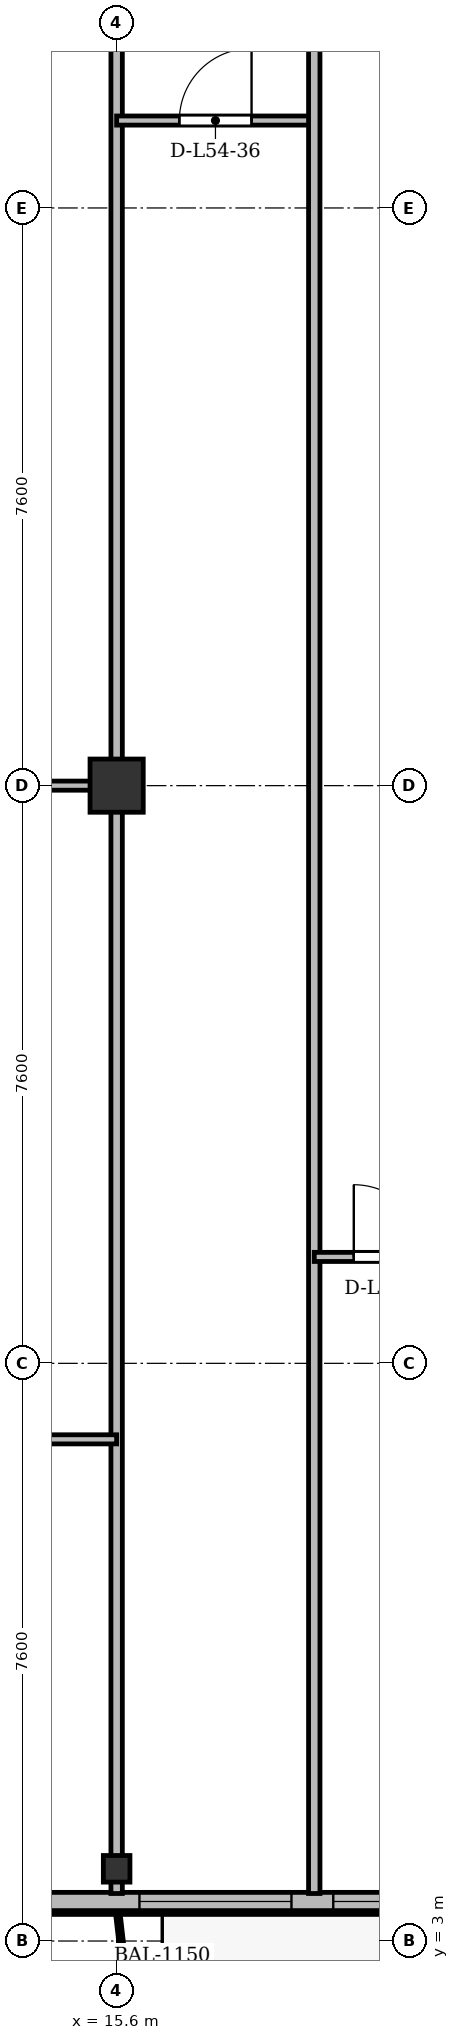
"""IFC4 building model, lengths in metres.
Left out: names, types, materials, properties, quantities, classifications, styles, units other than length and angle.
Written with IfcOpenShell. Run it as: python <this file> out.ifc"""

import sys

from ifc_helpers import new_model, si_unit, direction, frame, frame_2d, origin, origin_2d, place, context, subcontext, project, spatial, rectangle, i_section, extrude, source, transform, mapped, element, fill, save


model = new_model("IFC4")
c1 = context("Model", 3, precision=1e-05, world=origin(), true_north=direction((0.0, 1.0)))
c2 = subcontext(c1, "Body", "Model", "MODEL_VIEW")
j1 = project(units=[si_unit("LENGTHUNIT", "METRE"), si_unit("PLANEANGLEUNIT", "RADIAN")], contexts=[c1])
p1 = place(None, origin())
s1 = spatial("IfcSite", under=j1, at=p1, CompositionType="ELEMENT")
p2 = place(p1, origin())
s2 = spatial("IfcBuilding", under=s1, at=p2, CompositionType="ELEMENT")
p3 = place(p2, frame((0.0, 0.0, 208.5)))
s3 = spatial("IfcBuildingStorey", under=s2, at=p3, CompositionType="ELEMENT", Elevation=208.5)
m1 = source(origin(), c2, "Body", "SweptSolid", [
    extrude(i_section(OverallWidth=0.35, OverallDepth=0.35, WebThickness=0.018, FlangeThickness=0.028, at=origin_2d()), origin(), (0.0, 0.0, 1.0), 3.6),
])
p4 = place(p3, frame((15.6, 3.95, 0.0), z_axis=(0.0, 0.0, 1.0), x_axis=(1.0, 0.0, 0.0)))
e1 = element("IfcColumn", 1, at=p4, inside=s3, PredefinedType="COLUMN", context=c2, shape_type="MappedRepresentation", body=[
    mapped(m1, transform((0.0, 0.0, 0.0), x_axis=(1.0, 0.0, 0.0), y_axis=(0.0, 1.0, 0.0), z_axis=(0.0, 0.0, 1.0), scale=1.0)),
])
m2 = source(origin(), c2, "Body", "SweptSolid", [
    extrude(rectangle(XDim=0.7, YDim=0.7, at=origin_2d()), origin(), (0.0, 0.0, 1.0), 3.6),
])
p5 = place(p3, frame((15.6, 18.2, 0.0), z_axis=(0.0, 0.0, 1.0), x_axis=(1.0, 0.0, 0.0)))
e2 = element("IfcColumn", 2, at=p5, inside=s3, PredefinedType="COLUMN", context=c2, shape_type="MappedRepresentation", body=[
    mapped(m2, transform((0.0, 0.0, 0.0), x_axis=(1.0, 0.0, 0.0), y_axis=(0.0, 1.0, 0.0), z_axis=(0.0, 0.0, 1.0), scale=1.0)),
])
p6 = place(p3, frame((63.4, 3.52, 0.0), z_axis=(0.0, 0.0, 1.0), x_axis=(-1.0, 0.0, 0.0)))
e3 = element("IfcWall", 3, at=p6, inside=s3, PredefinedType="SOLIDWALL", context=c2, shape_type="SweptSolid", body=[
    extrude(rectangle(XDim=52.4, YDim=0.24, at=frame_2d((26.2, 0.0))), origin(), (0.0, 0.0, 1.0), 3.36),
])
p7 = place(p6, frame((1.52, 0.0, 0.9)))
e4 = element("IfcOpeningElement", 4, at=p7, cuts=e3, PredefinedType="OPENING", context=c2, shape_type="SweptSolid", body=[
    extrude(rectangle(XDim=1.65, YDim=1.85, at=frame_2d((0.825, 0.925))), frame((0.0, 0.13, 0.0), z_axis=(0.0, -1.0, 0.0), x_axis=(1.0, 0.0, 0.0)), (0.0, 0.0, 1.0), 0.26),
])
p8 = place(p6, frame((5.0, 0.0, 0.9)))
e5 = element("IfcOpeningElement", 5, at=p8, cuts=e3, PredefinedType="OPENING", context=c2, shape_type="SweptSolid", body=[
    extrude(rectangle(XDim=1.8, YDim=1.8, at=frame_2d((0.9, 0.9))), frame((0.0, 0.13, 0.0), z_axis=(0.0, -1.0, 0.0), x_axis=(1.0, 0.0, 0.0)), (0.0, 0.0, 1.0), 0.26),
])
p9 = place(p6, frame((7.45, 0.0, 0.9)))
e6 = element("IfcOpeningElement", 6, at=p9, cuts=e3, PredefinedType="OPENING", context=c2, shape_type="SweptSolid", body=[
    extrude(rectangle(XDim=1.5, YDim=1.75, at=frame_2d((0.75, 0.875))), frame((0.0, 0.13, 0.0), z_axis=(0.0, -1.0, 0.0), x_axis=(1.0, 0.0, 0.0)), (0.0, 0.0, 1.0), 0.26),
])
p10 = place(p6, frame((10.05, 0.0, 0.9)))
e7 = element("IfcOpeningElement", 7, at=p10, cuts=e3, PredefinedType="OPENING", context=c2, shape_type="SweptSolid", body=[
    extrude(rectangle(XDim=1.5, YDim=1.75, at=frame_2d((0.75, 0.875))), frame((0.0, 0.13, 0.0), z_axis=(0.0, -1.0, 0.0), x_axis=(1.0, 0.0, 0.0)), (0.0, 0.0, 1.0), 0.26),
])
p11 = place(p6, frame((14.217, 0.0, 0.0)))
e8 = element("IfcOpeningElement", 8, at=p11, cuts=e3, PredefinedType="OPENING", context=c2, shape_type="SweptSolid", body=[
    extrude(rectangle(XDim=1.2, YDim=2.2, at=frame_2d((0.6, 1.1))), frame((0.0, 0.13, 0.0), z_axis=(0.0, -1.0, 0.0), x_axis=(1.0, 0.0, 0.0)), (0.0, 0.0, 1.0), 0.26),
])
p12 = place(p6, frame((20.108, 0.0, 0.9)))
e9 = element("IfcOpeningElement", 9, at=p12, cuts=e3, PredefinedType="OPENING", context=c2, shape_type="SweptSolid", body=[
    extrude(rectangle(XDim=1.65, YDim=1.85, at=frame_2d((0.825, 0.925))), frame((0.0, 0.13, 0.0), z_axis=(0.0, -1.0, 0.0), x_axis=(1.0, 0.0, 0.0)), (0.0, 0.0, 1.0), 0.26),
])
p13 = place(p6, frame((22.7, 0.0, 0.9)))
e10 = element("IfcOpeningElement", 10, at=p13, cuts=e3, PredefinedType="OPENING", context=c2, shape_type="SweptSolid", body=[
    extrude(rectangle(XDim=1.8, YDim=1.8, at=frame_2d((0.9, 0.9))), frame((0.0, 0.13, 0.0), z_axis=(0.0, -1.0, 0.0), x_axis=(1.0, 0.0, 0.0)), (0.0, 0.0, 1.0), 0.26),
])
p14 = place(p6, frame((25.166, 0.0, 0.9)))
e11 = element("IfcOpeningElement", 11, at=p14, cuts=e3, PredefinedType="OPENING", context=c2, shape_type="SweptSolid", body=[
    extrude(rectangle(XDim=2.2, YDim=1.8, at=frame_2d((1.1, 0.9))), frame((0.0, 0.13, 0.0), z_axis=(0.0, -1.0, 0.0), x_axis=(1.0, 0.0, 0.0)), (0.0, 0.0, 1.0), 0.26),
])
p15 = place(p6, frame((29.45, 0.0, 0.9)))
e12 = element("IfcOpeningElement", 12, at=p15, cuts=e3, PredefinedType="OPENING", context=c2, shape_type="SweptSolid", body=[
    extrude(rectangle(XDim=1.5, YDim=1.75, at=frame_2d((0.75, 0.875))), frame((0.0, 0.13, 0.0), z_axis=(0.0, -1.0, 0.0), x_axis=(1.0, 0.0, 0.0)), (0.0, 0.0, 1.0), 0.26),
])
p16 = place(p6, frame((33.0, 0.0, 0.9)))
e13 = element("IfcOpeningElement", 13, at=p16, cuts=e3, PredefinedType="OPENING", context=c2, shape_type="SweptSolid", body=[
    extrude(rectangle(XDim=2.0, YDim=1.95, at=frame_2d((1.0, 0.975))), frame((0.0, 0.13, 0.0), z_axis=(0.0, -1.0, 0.0), x_axis=(1.0, 0.0, 0.0)), (0.0, 0.0, 1.0), 0.26),
])
p17 = place(p6, frame((35.575, 0.0, 0.9)))
e14 = element("IfcOpeningElement", 14, at=p17, cuts=e3, PredefinedType="OPENING", context=c2, shape_type="SweptSolid", body=[
    extrude(rectangle(XDim=1.65, YDim=1.85, at=frame_2d((0.825, 0.925))), frame((0.0, 0.13, 0.0), z_axis=(0.0, -1.0, 0.0), x_axis=(1.0, 0.0, 0.0)), (0.0, 0.0, 1.0), 0.26),
])
p18 = place(p6, frame((37.9, 0.0, 0.9)))
e15 = element("IfcOpeningElement", 15, at=p18, cuts=e3, PredefinedType="OPENING", context=c2, shape_type="SweptSolid", body=[
    extrude(rectangle(XDim=1.8, YDim=1.8, at=frame_2d((0.9, 0.9))), frame((0.0, 0.13, 0.0), z_axis=(0.0, -1.0, 0.0), x_axis=(1.0, 0.0, 0.0)), (0.0, 0.0, 1.0), 0.26),
])
p19 = place(p6, frame((41.456, 0.0, 0.0)))
e16 = element("IfcOpeningElement", 16, at=p19, cuts=e3, PredefinedType="OPENING", context=c2, shape_type="SweptSolid", body=[
    extrude(rectangle(XDim=1.2, YDim=2.2, at=frame_2d((0.6, 1.1))), frame((0.0, 0.13, 0.0), z_axis=(0.0, -1.0, 0.0), x_axis=(1.0, 0.0, 0.0)), (0.0, 0.0, 1.0), 0.26),
])
p20 = place(p6, frame((43.45, 0.0, 0.9)))
e17 = element("IfcOpeningElement", 17, at=p20, cuts=e3, PredefinedType="OPENING", context=c2, shape_type="SweptSolid", body=[
    extrude(rectangle(XDim=1.5, YDim=1.75, at=frame_2d((0.75, 0.875))), frame((0.0, 0.13, 0.0), z_axis=(0.0, -1.0, 0.0), x_axis=(1.0, 0.0, 0.0)), (0.0, 0.0, 1.0), 0.26),
])
p21 = place(p6, frame((45.5, 0.0, 0.9)))
e18 = element("IfcOpeningElement", 18, at=p21, cuts=e3, PredefinedType="OPENING", context=c2, shape_type="SweptSolid", body=[
    extrude(rectangle(XDim=2.0, YDim=1.95, at=frame_2d((1.0, 0.975))), frame((0.0, 0.13, 0.0), z_axis=(0.0, -1.0, 0.0), x_axis=(1.0, 0.0, 0.0)), (0.0, 0.0, 1.0), 0.26),
])
p22 = place(p6, frame((49.23, 0.0, 0.9)))
e19 = element("IfcOpeningElement", 19, at=p22, cuts=e3, PredefinedType="OPENING", context=c2, shape_type="SweptSolid", body=[
    extrude(rectangle(XDim=1.65, YDim=1.85, at=frame_2d((0.825, 0.925))), frame((0.0, 0.13, 0.0), z_axis=(0.0, -1.0, 0.0), x_axis=(1.0, 0.0, 0.0)), (0.0, 0.0, 1.0), 0.26),
])
p23 = place(p3, frame((15.6, 3.625, 0.0), z_axis=(0.0, 0.0, 1.0), x_axis=(0.0, 1.0, 0.0)))
e20 = element("IfcWall", 20, at=p23, inside=s3, PredefinedType="PARTITIONING", context=c2, shape_type="SweptSolid", body=[
    extrude(rectangle(XDim=27.175, YDim=0.15, at=frame_2d((13.587, 0.0))), origin(), (0.0, 0.0, 1.0), 2.86),
])
p24 = place(p3, frame((8.24, 18.2, 0.0), z_axis=(0.0, 0.0, 1.0), x_axis=(1.0, 0.0, 0.0)))
e21 = element("IfcWall", 21, at=p24, inside=s3, PredefinedType="PARTITIONING", context=c2, shape_type="SweptSolid", body=[
    extrude(rectangle(XDim=7.36, YDim=0.12, at=frame_2d((3.68, 0.0))), origin(), (0.0, 0.0, 1.0), 2.91),
])
p25 = place(p24, frame((3.114, 0.0, 0.0)))
e22 = element("IfcOpeningElement", 22, at=p25, cuts=e21, PredefinedType="OPENING", context=c2, shape_type="SweptSolid", body=[
    extrude(rectangle(XDim=0.95, YDim=2.15, at=frame_2d((0.475, 1.075))), frame((0.0, 0.07, 0.0), z_axis=(0.0, -1.0, 0.0), x_axis=(1.0, 0.0, 0.0)), (0.0, 0.0, 1.0), 0.14),
])
p26 = place(p3, frame((8.24, 9.6, 0.0), z_axis=(0.0, 0.0, 1.0), x_axis=(1.0, 0.0, 0.0)))
e23 = element("IfcWall", 23, at=p26, inside=s3, PredefinedType="PARTITIONING", context=c2, shape_type="SweptSolid", body=[
    extrude(rectangle(XDim=7.36, YDim=0.12, at=frame_2d((3.68, 0.0))), origin(), (0.0, 0.0, 1.0), 2.86),
])
p27 = place(p26, frame((3.114, 0.0, 0.0)))
e24 = element("IfcOpeningElement", 24, at=p27, cuts=e23, PredefinedType="OPENING", context=c2, shape_type="SweptSolid", body=[
    extrude(rectangle(XDim=0.95, YDim=2.15, at=frame_2d((0.475, 1.075))), frame((0.0, 0.07, 0.0), z_axis=(0.0, -1.0, 0.0), x_axis=(1.0, 0.0, 0.0)), (0.0, 0.0, 1.0), 0.14),
])
p28 = place(p3, frame((15.6, 26.95, 0.0), z_axis=(0.0, 0.0, 1.0), x_axis=(1.0, 0.0, 0.0)))
e25 = element("IfcWall", 25, at=p28, inside=s3, PredefinedType="PARTITIONING", context=c2, shape_type="SweptSolid", body=[
    extrude(rectangle(XDim=2.6, YDim=0.12, at=frame_2d((1.3, 0.0))), origin(), (0.0, 0.0, 1.0), 2.86),
])
p29 = place(p28, frame((0.825, 0.0, 0.0)))
e26 = element("IfcOpeningElement", 26, at=p29, cuts=e25, PredefinedType="OPENING", context=c2, shape_type="SweptSolid", body=[
    extrude(rectangle(XDim=0.95, YDim=2.15, at=frame_2d((0.475, 1.075))), frame((0.0, 0.07, 0.0), z_axis=(0.0, -1.0, 0.0), x_axis=(1.0, 0.0, 0.0)), (0.0, 0.0, 1.0), 0.14),
])
p30 = place(p3, frame((18.2, 3.625, 0.0), z_axis=(0.0, 0.0, 1.0), x_axis=(0.0, 1.0, 0.0)))
e27 = element("IfcWall", 27, at=p30, inside=s3, PredefinedType="PARTITIONING", context=c2, shape_type="SweptSolid", body=[
    extrude(rectangle(XDim=27.175, YDim=0.15, at=frame_2d((13.587, 0.0))), origin(), (0.0, 0.0, 1.0), 2.91),
])
p31 = place(p3, frame((18.2, 12.0, 0.0), z_axis=(0.0, 0.0, 1.0), x_axis=(1.0, 0.0, 0.0)))
e28 = element("IfcWall", 28, at=p31, inside=s3, PredefinedType="PARTITIONING", context=c2, shape_type="SweptSolid", body=[
    extrude(rectangle(XDim=2.0, YDim=0.12, at=frame_2d((1.0, 0.0))), origin(), (0.0, 0.0, 1.0), 3.36),
])
p32 = place(p31, frame((0.52, 0.0, 0.0)))
e29 = element("IfcOpeningElement", 29, at=p32, cuts=e28, PredefinedType="OPENING", context=c2, shape_type="SweptSolid", body=[
    extrude(rectangle(XDim=0.95, YDim=2.15, at=frame_2d((0.475, 1.075))), frame((0.0, 0.07, 0.0), z_axis=(0.0, -1.0, 0.0), x_axis=(1.0, 0.0, 0.0)), (0.0, 0.0, 1.0), 0.14),
])
m3 = source(origin(), c2, "Body", "SweptSolid", [
    extrude(rectangle(XDim=1.5, YDim=1.75, at=frame_2d((0.75, 0.875))), frame((0.0, 0.03, 0.0), z_axis=(0.0, -1.0, 0.0), x_axis=(1.0, 0.0, 0.0)), (0.0, 0.0, 1.0), 0.06),
])
p33 = place(p20, origin())
e30 = element("IfcWindow", 30, at=p33, inside=s3, PartitioningType="SINGLE_PANEL", PredefinedType="WINDOW", context=c2, shape_type="MappedRepresentation", body=[
    mapped(m3, transform((0.0, 0.0, 0.0), x_axis=(1.0, 0.0, 0.0), y_axis=(0.0, 1.0, 0.0), z_axis=(0.0, 0.0, 1.0), scale=1.0)),
])
fill(e17, e30)
m4 = source(origin(), c2, "Body", "SweptSolid", [
    extrude(rectangle(XDim=2.0, YDim=1.95, at=frame_2d((1.0, 0.975))), frame((0.0, 0.03, 0.0), z_axis=(0.0, -1.0, 0.0), x_axis=(1.0, 0.0, 0.0)), (0.0, 0.0, 1.0), 0.06),
])
p34 = place(p21, origin())
e31 = element("IfcWindow", 31, at=p34, inside=s3, PartitioningType="SINGLE_PANEL", PredefinedType="WINDOW", context=c2, shape_type="MappedRepresentation", body=[
    mapped(m4, transform((0.0, 0.0, 0.0), x_axis=(1.0, 0.0, 0.0), y_axis=(0.0, 1.0, 0.0), z_axis=(0.0, 0.0, 1.0), scale=1.0)),
])
fill(e18, e31)
m5 = source(origin(), c2, "Body", "SweptSolid", [
    extrude(rectangle(XDim=0.95, YDim=2.15, at=frame_2d((0.475, 1.075))), frame((0.0, 0.025, 0.0), z_axis=(0.0, -1.0, 0.0), x_axis=(1.0, 0.0, 0.0)), (0.0, 0.0, 1.0), 0.05),
])
p35 = place(p29, origin())
e32 = element("IfcDoor", 32, at=p35, inside=s3, OperationType="SINGLE_SWING_RIGHT", PredefinedType="DOOR", context=c2, shape_type="MappedRepresentation", body=[
    mapped(m5, transform((0.0, 0.0, 0.0), x_axis=(1.0, 0.0, 0.0), y_axis=(0.0, 1.0, 0.0), z_axis=(0.0, 0.0, 1.0), scale=1.0)),
])
fill(e26, e32)
p36 = place(p32, origin())
e33 = element("IfcDoor", 33, at=p36, inside=s3, OperationType="SINGLE_SWING_LEFT", PredefinedType="DOOR", context=c2, shape_type="MappedRepresentation", body=[
    mapped(m5, transform((0.0, 0.0, 0.0), x_axis=(1.0, 0.0, 0.0), y_axis=(0.0, 1.0, 0.0), z_axis=(0.0, 0.0, 1.0), scale=1.0)),
])
fill(e29, e33)
save(model, sys.argv[1])
